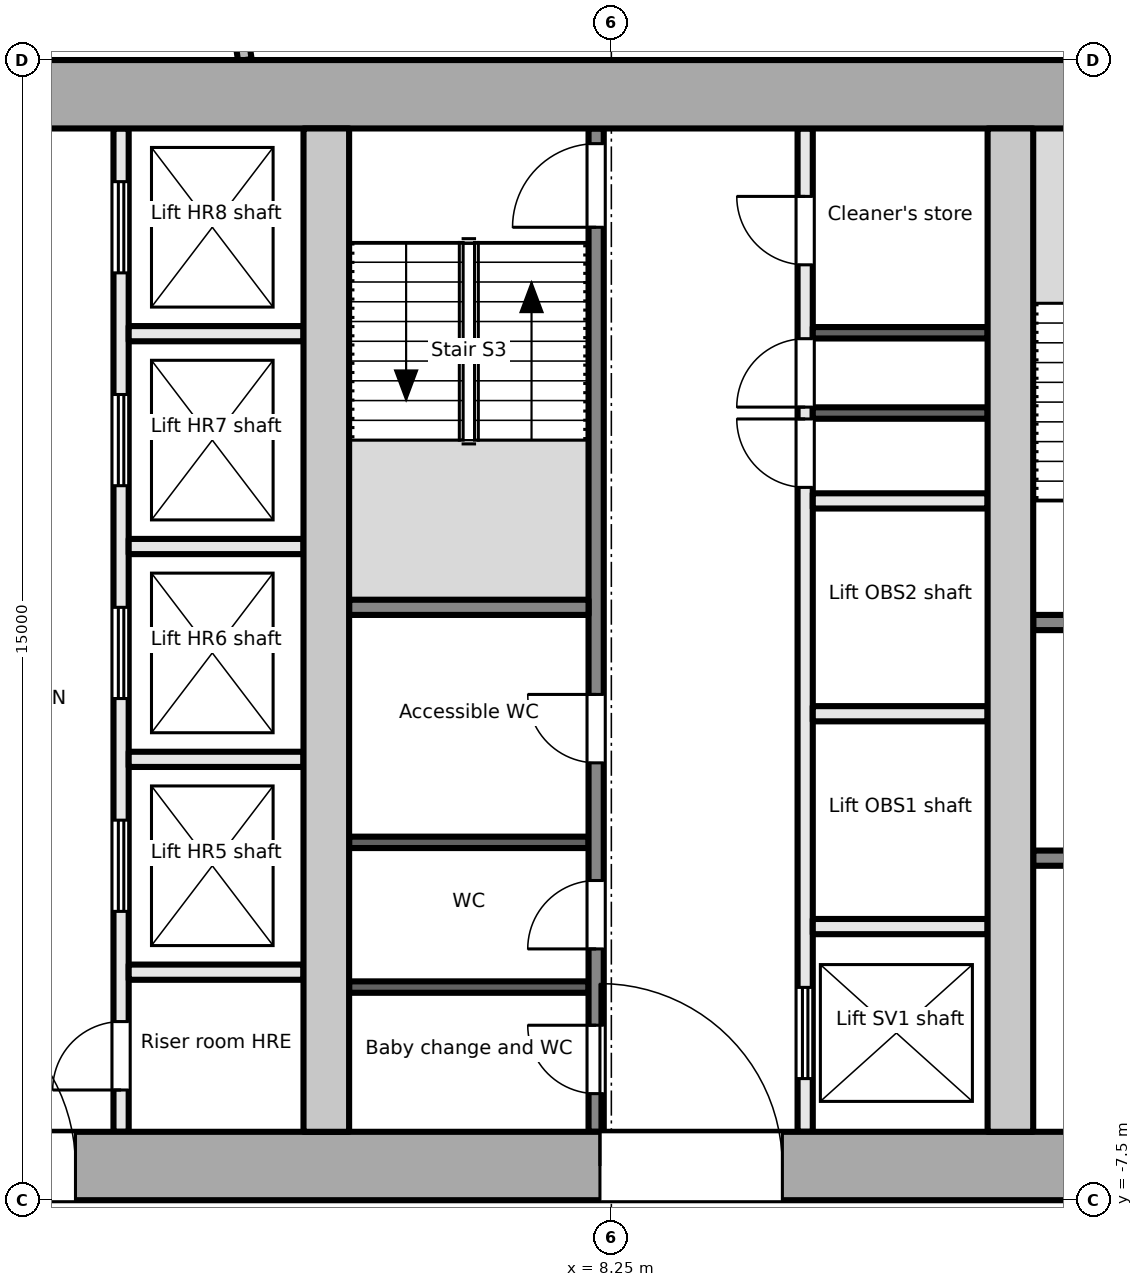
"""IFC4 building model, lengths in metres.
Left out: names, types, materials, properties, quantities, classifications, styles, units other than length and angle.
Written with IfcOpenShell. Run it as: python <this file> out.ifc"""

import sys

from ifc_helpers import new_model, si_unit, direction, frame, frame_2d, origin, place, context, subcontext, project, spatial, rectangle, extrude, element, fill, save


model = new_model("IFC4")
c1 = context("Model", 3, precision=1e-05, world=origin(), true_north=direction((0.0, 1.0)))
c2 = subcontext(c1, "Body", "Model", "MODEL_VIEW")
j1 = project(units=[si_unit("LENGTHUNIT", "METRE"), si_unit("PLANEANGLEUNIT", "RADIAN")], contexts=[c1])
p1 = place(None, origin())
s1 = spatial("IfcSite", under=j1, at=p1, CompositionType="ELEMENT")
p2 = place(p1, origin())
s2 = spatial("IfcBuilding", under=s1, at=p2, CompositionType="ELEMENT")
p3 = place(p2, frame((0.0, 0.0, 191.9)))
s3 = spatial("IfcBuildingStorey", under=s2, at=p3, CompositionType="ELEMENT", Elevation=191.9)
p4 = place(p3, frame((-18.0, -7.05, -0.2), z_axis=(0.0, 0.0, 1.0), x_axis=(1.0, 0.0, 0.0)))
e1 = element("IfcWall", 1, at=p4, inside=s3, PredefinedType="SHEAR", context=c2, shape_type="SweptSolid", body=[
    extrude(rectangle(XDim=36.0, YDim=0.9, at=frame_2d((18.0, 0.0))), origin(), (0.0, 0.0, 1.0), 3.9),
])
p5 = place(p4, frame((8.1, 0.0, 0.2)))
e2 = element("IfcOpeningElement", 2, at=p5, cuts=e1, PredefinedType="OPENING", context=c2, shape_type="SweptSolid", body=[
    extrude(rectangle(XDim=1.8, YDim=2.1, at=frame_2d((0.9, 1.05))), frame((0.0, 0.46, 0.0), z_axis=(0.0, -1.0, 0.0), x_axis=(1.0, 0.0, 0.0)), (0.0, 0.0, 1.0), 0.921),
])
p6 = place(p4, frame((16.8, 0.0, 0.2)))
e3 = element("IfcOpeningElement", 3, at=p6, cuts=e1, PredefinedType="OPENING", context=c2, shape_type="SweptSolid", body=[
    extrude(rectangle(XDim=2.4, YDim=2.1, at=frame_2d((1.2, 1.05))), frame((0.0, 0.46, 0.0), z_axis=(0.0, -1.0, 0.0), x_axis=(1.0, 0.0, 0.0)), (0.0, 0.0, 1.0), 0.921),
])
p7 = place(p4, frame((26.1, 0.0, 0.2)))
e4 = element("IfcOpeningElement", 4, at=p7, cuts=e1, PredefinedType="OPENING", context=c2, shape_type="SweptSolid", body=[
    extrude(rectangle(XDim=2.4, YDim=2.1, at=frame_2d((1.2, 1.05))), frame((0.0, 0.46, 0.0), z_axis=(0.0, -1.0, 0.0), x_axis=(1.0, 0.0, 0.0)), (0.0, 0.0, 1.0), 0.921),
])
p8 = place(p3, frame((-18.0, 7.05, -0.2), z_axis=(0.0, 0.0, 1.0), x_axis=(1.0, 0.0, 0.0)))
e5 = element("IfcWall", 5, at=p8, inside=s3, PredefinedType="SHEAR", context=c2, shape_type="SweptSolid", body=[
    extrude(rectangle(XDim=36.0, YDim=0.9, at=frame_2d((18.0, 0.0))), origin(), (0.0, 0.0, 1.0), 3.9),
])
for number, where, z_axis, x_axis in (
    (6, (4.5, -6.6, -0.2), (0.0, 0.0, 1.0), (0.0, 1.0, 0.0)),
    (7, (13.5, -6.6, -0.2), (0.0, 0.0, 1.0), (0.0, 1.0, 0.0)),
):
    element("IfcWall", number, at=place(p3, frame(where, z_axis=z_axis, x_axis=x_axis)), inside=s3, PredefinedType="SHEAR", context=c2, shape_type="SweptSolid", body=[
        extrude(rectangle(XDim=13.2, YDim=0.6, at=frame_2d((6.6, 0.0))), origin(), (0.0, 0.0, 1.0), 3.9),
    ])
p9 = place(p3, frame((13.8, -3.0, 0.0), z_axis=(0.0, 0.0, 1.0), x_axis=(1.0, 0.0, 0.0)))
e8 = element("IfcWall", 8, at=p9, inside=s3, PredefinedType="PARTITIONING", context=c2, shape_type="SweptSolid", body=[
    extrude(rectangle(XDim=3.3, YDim=0.2, at=frame_2d((1.65, 0.0))), origin(), (0.0, 0.0, 1.0), 3.7),
])
p10 = place(p9, frame((1.1, 0.0, 0.0)))
e9 = element("IfcOpeningElement", 9, at=p10, cuts=e8, PredefinedType="OPENING", context=c2, shape_type="SweptSolid", body=[
    extrude(rectangle(XDim=1.1, YDim=2.1, at=frame_2d((0.55, 1.05))), frame((0.0, 0.111, 0.0), z_axis=(0.0, -1.0, 0.0), x_axis=(1.0, 0.0, 0.0)), (0.0, 0.0, 1.0), 0.221),
])
p11 = place(p3, frame((13.8, 0.1, 0.0), z_axis=(0.0, 0.0, 1.0), x_axis=(1.0, 0.0, 0.0)))
e10 = element("IfcWall", 10, at=p11, inside=s3, PredefinedType="PARTITIONING", context=c2, shape_type="SweptSolid", body=[
    extrude(rectangle(XDim=3.3, YDim=0.2, at=frame_2d((1.65, 0.0))), origin(), (0.0, 0.0, 1.0), 3.7),
])
p12 = place(p11, frame((1.1, 0.0, 0.0)))
e11 = element("IfcOpeningElement", 11, at=p12, cuts=e10, PredefinedType="OPENING", context=c2, shape_type="SweptSolid", body=[
    extrude(rectangle(XDim=1.1, YDim=2.1, at=frame_2d((0.55, 1.05))), frame((0.0, 0.111, 0.0), z_axis=(0.0, -1.0, 0.0), x_axis=(1.0, 0.0, 0.0)), (0.0, 0.0, 1.0), 0.221),
])
p13 = place(p3, frame((1.8, -6.6, 0.0), z_axis=(0.0, 0.0, 1.0), x_axis=(0.0, 1.0, 0.0)))
e12 = element("IfcWall", 12, at=p13, inside=s3, PredefinedType="PARTITIONING", context=c2, shape_type="SweptSolid", body=[
    extrude(rectangle(XDim=13.2, YDim=0.2, at=frame_2d((6.6, 0.0))), origin(), (0.0, 0.0, 1.0), 3.7),
])
p14 = place(p13, frame((0.55, 0.0, 0.0)))
e13 = element("IfcOpeningElement", 13, at=p14, cuts=e12, PredefinedType="OPENING", context=c2, shape_type="SweptSolid", body=[
    extrude(rectangle(XDim=0.9, YDim=2.1, at=frame_2d((0.45, 1.05))), frame((0.0, 0.111, 0.0), z_axis=(0.0, -1.0, 0.0), x_axis=(1.0, 0.0, 0.0)), (0.0, 0.0, 1.0), 0.221),
])
p15 = place(p13, frame((2.9, 0.0, 0.0)))
e14 = element("IfcOpeningElement", 14, at=p15, cuts=e12, PredefinedType="OPENING", context=c2, shape_type="SweptSolid", body=[
    extrude(rectangle(XDim=1.2, YDim=2.1, at=frame_2d((0.6, 1.05))), frame((0.0, 0.111, 0.0), z_axis=(0.0, -1.0, 0.0), x_axis=(1.0, 0.0, 0.0)), (0.0, 0.0, 1.0), 0.221),
])
p16 = place(p13, frame((5.7, 0.0, 0.0)))
e15 = element("IfcOpeningElement", 15, at=p16, cuts=e12, PredefinedType="OPENING", context=c2, shape_type="SweptSolid", body=[
    extrude(rectangle(XDim=1.2, YDim=2.1, at=frame_2d((0.6, 1.05))), frame((0.0, 0.111, 0.0), z_axis=(0.0, -1.0, 0.0), x_axis=(1.0, 0.0, 0.0)), (0.0, 0.0, 1.0), 0.221),
])
p17 = place(p13, frame((8.5, 0.0, 0.0)))
e16 = element("IfcOpeningElement", 16, at=p17, cuts=e12, PredefinedType="OPENING", context=c2, shape_type="SweptSolid", body=[
    extrude(rectangle(XDim=1.2, YDim=2.1, at=frame_2d((0.6, 1.05))), frame((0.0, 0.111, 0.0), z_axis=(0.0, -1.0, 0.0), x_axis=(1.0, 0.0, 0.0)), (0.0, 0.0, 1.0), 0.221),
])
p18 = place(p13, frame((11.3, 0.0, 0.0)))
e17 = element("IfcOpeningElement", 17, at=p18, cuts=e12, PredefinedType="OPENING", context=c2, shape_type="SweptSolid", body=[
    extrude(rectangle(XDim=1.2, YDim=2.1, at=frame_2d((0.6, 1.05))), frame((0.0, 0.111, 0.0), z_axis=(0.0, -1.0, 0.0), x_axis=(1.0, 0.0, 0.0)), (0.0, 0.0, 1.0), 0.221),
])
for number, where, z_axis, x_axis in (
    (18, (1.9, -1.7, 0.0), (0.0, 0.0, 1.0), (1.0, 0.0, 0.0)),
    (19, (1.9, 1.1, 0.0), (0.0, 0.0, 1.0), (1.0, 0.0, 0.0)),
    (20, (1.9, 3.9, 0.0), (0.0, 0.0, 1.0), (1.0, 0.0, 0.0)),
    (21, (1.9, -4.5, 0.0), (0.0, 0.0, 1.0), (1.0, 0.0, 0.0)),
):
    element("IfcWall", number, at=place(p3, frame(where, z_axis=z_axis, x_axis=x_axis)), inside=s3, PredefinedType="PARTITIONING", context=c2, shape_type="SweptSolid", body=[
        extrude(rectangle(XDim=2.3, YDim=0.2, at=frame_2d((1.15, 0.0))), origin(), (0.0, 0.0, 1.0), 3.7),
    ])
p19 = place(p3, frame((8.05, -6.6, 0.0), z_axis=(0.0, 0.0, 1.0), x_axis=(0.0, 1.0, 0.0)))
e22 = element("IfcWall", 22, at=p19, inside=s3, PredefinedType="PARTITIONING", context=c2, shape_type="SweptSolid", body=[
    extrude(rectangle(XDim=13.2, YDim=0.2, at=frame_2d((6.6, 0.0))), origin(), (0.0, 0.0, 1.0), 3.7),
])
p20 = place(p19, frame((0.502, 0.0, 0.0)))
e23 = element("IfcOpeningElement", 23, at=p20, cuts=e22, PredefinedType="OPENING", context=c2, shape_type="SweptSolid", body=[
    extrude(rectangle(XDim=0.9, YDim=2.1, at=frame_2d((0.45, 1.05))), frame((0.0, 0.111, 0.0), z_axis=(0.0, -1.0, 0.0), x_axis=(1.0, 0.0, 0.0)), (0.0, 0.0, 1.0), 0.221),
])
p21 = place(p19, frame((2.406, 0.0, 0.0)))
e24 = element("IfcOpeningElement", 24, at=p21, cuts=e22, PredefinedType="OPENING", context=c2, shape_type="SweptSolid", body=[
    extrude(rectangle(XDim=0.9, YDim=2.1, at=frame_2d((0.45, 1.05))), frame((0.0, 0.111, 0.0), z_axis=(0.0, -1.0, 0.0), x_axis=(1.0, 0.0, 0.0)), (0.0, 0.0, 1.0), 0.221),
])
p22 = place(p19, frame((4.854, 0.0, 0.0)))
e25 = element("IfcOpeningElement", 25, at=p22, cuts=e22, PredefinedType="OPENING", context=c2, shape_type="SweptSolid", body=[
    extrude(rectangle(XDim=0.9, YDim=2.1, at=frame_2d((0.45, 1.05))), frame((0.0, 0.111, 0.0), z_axis=(0.0, -1.0, 0.0), x_axis=(1.0, 0.0, 0.0)), (0.0, 0.0, 1.0), 0.221),
])
p23 = place(p19, frame((11.9, 0.0, 0.0)))
e26 = element("IfcOpeningElement", 26, at=p23, cuts=e22, PredefinedType="OPENING", context=c2, shape_type="SweptSolid", body=[
    extrude(rectangle(XDim=1.1, YDim=2.1, at=frame_2d((0.55, 1.05))), frame((0.0, 0.111, 0.0), z_axis=(0.0, -1.0, 0.0), x_axis=(1.0, 0.0, 0.0)), (0.0, 0.0, 1.0), 0.221),
])
p24 = place(p3, frame((10.8, -6.6, 0.0), z_axis=(0.0, 0.0, 1.0), x_axis=(0.0, 1.0, 0.0)))
e27 = element("IfcWall", 27, at=p24, inside=s3, PredefinedType="PARTITIONING", context=c2, shape_type="SweptSolid", body=[
    extrude(rectangle(XDim=13.2, YDim=0.2, at=frame_2d((6.6, 0.0))), origin(), (0.0, 0.0, 1.0), 3.7),
])
p25 = place(p24, frame((0.7, 0.0, 0.0)))
e28 = element("IfcOpeningElement", 28, at=p25, cuts=e27, PredefinedType="OPENING", context=c2, shape_type="SweptSolid", body=[
    extrude(rectangle(XDim=1.2, YDim=2.1, at=frame_2d((0.6, 1.05))), frame((0.0, 0.111, 0.0), z_axis=(0.0, -1.0, 0.0), x_axis=(1.0, 0.0, 0.0)), (0.0, 0.0, 1.0), 0.221),
])
p26 = place(p24, frame((8.478, 0.0, 0.0)))
e29 = element("IfcOpeningElement", 29, at=p26, cuts=e27, PredefinedType="OPENING", context=c2, shape_type="SweptSolid", body=[
    extrude(rectangle(XDim=0.9, YDim=2.1, at=frame_2d((0.45, 1.05))), frame((0.0, 0.111, 0.0), z_axis=(0.0, -1.0, 0.0), x_axis=(1.0, 0.0, 0.0)), (0.0, 0.0, 1.0), 0.221),
])
p27 = place(p24, frame((9.534, 0.0, 0.0)))
e30 = element("IfcOpeningElement", 30, at=p27, cuts=e27, PredefinedType="OPENING", context=c2, shape_type="SweptSolid", body=[
    extrude(rectangle(XDim=0.9, YDim=2.1, at=frame_2d((0.45, 1.05))), frame((0.0, 0.111, 0.0), z_axis=(0.0, -1.0, 0.0), x_axis=(1.0, 0.0, 0.0)), (0.0, 0.0, 1.0), 0.221),
])
p28 = place(p24, frame((11.406, 0.0, 0.0)))
e31 = element("IfcOpeningElement", 31, at=p28, cuts=e27, PredefinedType="OPENING", context=c2, shape_type="SweptSolid", body=[
    extrude(rectangle(XDim=0.9, YDim=2.1, at=frame_2d((0.45, 1.05))), frame((0.0, 0.111, 0.0), z_axis=(0.0, -1.0, 0.0), x_axis=(1.0, 0.0, 0.0)), (0.0, 0.0, 1.0), 0.221),
])
p29 = place(p3, frame((4.8, 0.3, 0.0), z_axis=(0.0, 0.0, 1.0), x_axis=(1.0, 0.0, 0.0)))
e32 = element("IfcWall", 32, at=p29, inside=s3, PredefinedType="PARTITIONING", context=c2, shape_type="SweptSolid", body=[
    extrude(rectangle(XDim=3.15, YDim=0.2, at=frame_2d((1.575, 0.0))), origin(), (0.0, 0.0, 1.0), 3.7),
])
for number, where, z_axis, x_axis in (
    (33, (4.8, -4.696, 0.0), (0.0, 0.0, 1.0), (1.0, 0.0, 0.0)),
    (34, (4.8, -2.792, 0.0), (0.0, 0.0, 1.0), (1.0, 0.0, 0.0)),
):
    element("IfcWall", number, at=place(p3, frame(where, z_axis=z_axis, x_axis=x_axis)), inside=s3, PredefinedType="PARTITIONING", context=c2, shape_type="SweptSolid", body=[
        extrude(rectangle(XDim=3.15, YDim=0.15, at=frame_2d((1.575, 0.0))), origin(), (0.0, 0.0, 1.0), 3.7),
    ])
for number, where, z_axis, x_axis in (
    (35, (10.9, -3.9, 0.0), (0.0, 0.0, 1.0), (1.0, 0.0, 0.0)),
    (36, (10.9, -1.1, 0.0), (0.0, 0.0, 1.0), (1.0, 0.0, 0.0)),
    (37, (10.9, 1.7, 0.0), (0.0, 0.0, 1.0), (1.0, 0.0, 0.0)),
):
    element("IfcWall", number, at=place(p3, frame(where, z_axis=z_axis, x_axis=x_axis)), inside=s3, PredefinedType="PARTITIONING", context=c2, shape_type="SweptSolid", body=[
        extrude(rectangle(XDim=2.3, YDim=0.2, at=frame_2d((1.15, 0.0))), origin(), (0.0, 0.0, 1.0), 3.7),
    ])
for number, where, z_axis, x_axis in (
    (38, (10.9, 2.856, 0.0), (0.0, 0.0, 1.0), (1.0, 0.0, 0.0)),
    (39, (10.9, 3.912, 0.0), (0.0, 0.0, 1.0), (1.0, 0.0, 0.0)),
):
    element("IfcWall", number, at=place(p3, frame(where, z_axis=z_axis, x_axis=x_axis)), inside=s3, PredefinedType="PARTITIONING", context=c2, shape_type="SweptSolid", body=[
        extrude(rectangle(XDim=2.3, YDim=0.15, at=frame_2d((1.15, 0.0))), origin(), (0.0, 0.0, 1.0), 3.7),
    ])
p30 = place(p3, frame((3.214, 9.024, 0.0), z_axis=(0.0, 0.0, 1.0), x_axis=(0.138977710078, -0.990295509483, 0.0)))
e40 = element("IfcWall", 40, at=p30, inside=s3, PredefinedType="PARTITIONING", context=c2, shape_type="SweptSolid", body=[
    extrude(rectangle(XDim=1.539, YDim=0.18, at=frame_2d((0.77, 0.0))), origin(), (0.0, 0.0, 1.0), 3.7),
])
p31 = place(p14, origin())
e41 = element("IfcDoor", 41, at=p31, inside=s3, OperationType="SINGLE_SWING_LEFT", PredefinedType="DOOR", context=c2, shape_type="SweptSolid", body=[
    extrude(rectangle(XDim=0.9, YDim=2.1, at=frame_2d((0.45, 1.05))), frame((0.0, 0.025, 0.0), z_axis=(0.0, -1.0, 0.0), x_axis=(1.0, 0.0, 0.0)), (0.0, 0.0, 1.0), 0.05),
])
fill(e13, e41)
p32 = place(p15, origin())
e42 = element("IfcDoor", 42, at=p32, inside=s3, OperationType="DOUBLE_DOOR_SLIDING", PredefinedType="DOOR", context=c2, shape_type="SweptSolid", body=[
    extrude(rectangle(XDim=1.2, YDim=2.1, at=frame_2d((0.6, 1.05))), frame((0.0, 0.025, 0.0), z_axis=(0.0, -1.0, 0.0), x_axis=(1.0, 0.0, 0.0)), (0.0, 0.0, 1.0), 0.05),
])
fill(e14, e42)
p33 = place(p16, origin())
e43 = element("IfcDoor", 43, at=p33, inside=s3, OperationType="DOUBLE_DOOR_SLIDING", PredefinedType="DOOR", context=c2, shape_type="SweptSolid", body=[
    extrude(rectangle(XDim=1.2, YDim=2.1, at=frame_2d((0.6, 1.05))), frame((0.0, 0.025, 0.0), z_axis=(0.0, -1.0, 0.0), x_axis=(1.0, 0.0, 0.0)), (0.0, 0.0, 1.0), 0.05),
])
fill(e15, e43)
p34 = place(p17, origin())
e44 = element("IfcDoor", 44, at=p34, inside=s3, OperationType="DOUBLE_DOOR_SLIDING", PredefinedType="DOOR", context=c2, shape_type="SweptSolid", body=[
    extrude(rectangle(XDim=1.2, YDim=2.1, at=frame_2d((0.6, 1.05))), frame((0.0, 0.025, 0.0), z_axis=(0.0, -1.0, 0.0), x_axis=(1.0, 0.0, 0.0)), (0.0, 0.0, 1.0), 0.05),
])
fill(e16, e44)
p35 = place(p18, origin())
e45 = element("IfcDoor", 45, at=p35, inside=s3, OperationType="DOUBLE_DOOR_SLIDING", PredefinedType="DOOR", context=c2, shape_type="SweptSolid", body=[
    extrude(rectangle(XDim=1.2, YDim=2.1, at=frame_2d((0.6, 1.05))), frame((0.0, 0.025, 0.0), z_axis=(0.0, -1.0, 0.0), x_axis=(1.0, 0.0, 0.0)), (0.0, 0.0, 1.0), 0.05),
])
fill(e17, e45)
p36 = place(p6, origin())
e46 = element("IfcDoor", 46, at=p36, inside=s3, OperationType="DOUBLE_DOOR_DOUBLE_SWING", PredefinedType="DOOR", context=c2, shape_type="SweptSolid", body=[
    extrude(rectangle(XDim=2.4, YDim=2.1, at=frame_2d((1.2, 1.05))), frame((0.0, 0.025, 0.0), z_axis=(0.0, -1.0, 0.0), x_axis=(1.0, 0.0, 0.0)), (0.0, 0.0, 1.0), 0.05),
])
fill(e3, e46)
p37 = place(p20, origin())
e47 = element("IfcDoor", 47, at=p37, inside=s3, OperationType="SINGLE_SWING_RIGHT", PredefinedType="DOOR", context=c2, shape_type="SweptSolid", body=[
    extrude(rectangle(XDim=0.9, YDim=2.1, at=frame_2d((0.45, 1.05))), frame((0.0, 0.025, 0.0), z_axis=(0.0, -1.0, 0.0), x_axis=(1.0, 0.0, 0.0)), (0.0, 0.0, 1.0), 0.05),
])
fill(e23, e47)
p38 = place(p21, origin())
e48 = element("IfcDoor", 48, at=p38, inside=s3, OperationType="SINGLE_SWING_LEFT", PredefinedType="DOOR", context=c2, shape_type="SweptSolid", body=[
    extrude(rectangle(XDim=0.9, YDim=2.1, at=frame_2d((0.45, 1.05))), frame((0.0, 0.025, 0.0), z_axis=(0.0, -1.0, 0.0), x_axis=(1.0, 0.0, 0.0)), (0.0, 0.0, 1.0), 0.05),
])
fill(e24, e48)
p39 = place(p22, origin())
e49 = element("IfcDoor", 49, at=p39, inside=s3, OperationType="SINGLE_SWING_RIGHT", PredefinedType="DOOR", context=c2, shape_type="SweptSolid", body=[
    extrude(rectangle(XDim=0.9, YDim=2.1, at=frame_2d((0.45, 1.05))), frame((0.0, 0.025, 0.0), z_axis=(0.0, -1.0, 0.0), x_axis=(1.0, 0.0, 0.0)), (0.0, 0.0, 1.0), 0.05),
])
fill(e25, e49)
p40 = place(p23, origin())
e50 = element("IfcDoor", 50, at=p40, inside=s3, OperationType="SINGLE_SWING_LEFT", PredefinedType="DOOR", context=c2, shape_type="SweptSolid", body=[
    extrude(rectangle(XDim=1.1, YDim=2.1, at=frame_2d((0.55, 1.05))), frame((0.0, 0.025, 0.0), z_axis=(0.0, -1.0, 0.0), x_axis=(1.0, 0.0, 0.0)), (0.0, 0.0, 1.0), 0.05),
])
fill(e26, e50)
p41 = place(p7, origin())
e51 = element("IfcDoor", 51, at=p41, inside=s3, OperationType="DOUBLE_DOOR_DOUBLE_SWING", PredefinedType="DOOR", context=c2, shape_type="SweptSolid", body=[
    extrude(rectangle(XDim=2.4, YDim=2.1, at=frame_2d((1.2, 1.05))), frame((0.0, 0.025, 0.0), z_axis=(0.0, -1.0, 0.0), x_axis=(1.0, 0.0, 0.0)), (0.0, 0.0, 1.0), 0.05),
])
fill(e4, e51)
p42 = place(p25, origin())
e52 = element("IfcDoor", 52, at=p42, inside=s3, OperationType="DOUBLE_DOOR_SLIDING", PredefinedType="DOOR", context=c2, shape_type="SweptSolid", body=[
    extrude(rectangle(XDim=1.2, YDim=2.1, at=frame_2d((0.6, 1.05))), frame((0.0, 0.025, 0.0), z_axis=(0.0, -1.0, 0.0), x_axis=(1.0, 0.0, 0.0)), (0.0, 0.0, 1.0), 0.05),
])
fill(e28, e52)
p43 = place(p26, origin())
e53 = element("IfcDoor", 53, at=p43, inside=s3, OperationType="SINGLE_SWING_RIGHT", PredefinedType="DOOR", context=c2, shape_type="SweptSolid", body=[
    extrude(rectangle(XDim=0.9, YDim=2.1, at=frame_2d((0.45, 1.05))), frame((0.0, 0.025, 0.0), z_axis=(0.0, -1.0, 0.0), x_axis=(1.0, 0.0, 0.0)), (0.0, 0.0, 1.0), 0.05),
])
fill(e29, e53)
p44 = place(p27, origin())
e54 = element("IfcDoor", 54, at=p44, inside=s3, OperationType="SINGLE_SWING_LEFT", PredefinedType="DOOR", context=c2, shape_type="SweptSolid", body=[
    extrude(rectangle(XDim=0.9, YDim=2.1, at=frame_2d((0.45, 1.05))), frame((0.0, 0.025, 0.0), z_axis=(0.0, -1.0, 0.0), x_axis=(1.0, 0.0, 0.0)), (0.0, 0.0, 1.0), 0.05),
])
fill(e30, e54)
p45 = place(p28, origin())
e55 = element("IfcDoor", 55, at=p45, inside=s3, OperationType="SINGLE_SWING_RIGHT", PredefinedType="DOOR", context=c2, shape_type="SweptSolid", body=[
    extrude(rectangle(XDim=0.9, YDim=2.1, at=frame_2d((0.45, 1.05))), frame((0.0, 0.025, 0.0), z_axis=(0.0, -1.0, 0.0), x_axis=(1.0, 0.0, 0.0)), (0.0, 0.0, 1.0), 0.05),
])
fill(e31, e55)
save(model, sys.argv[1])
